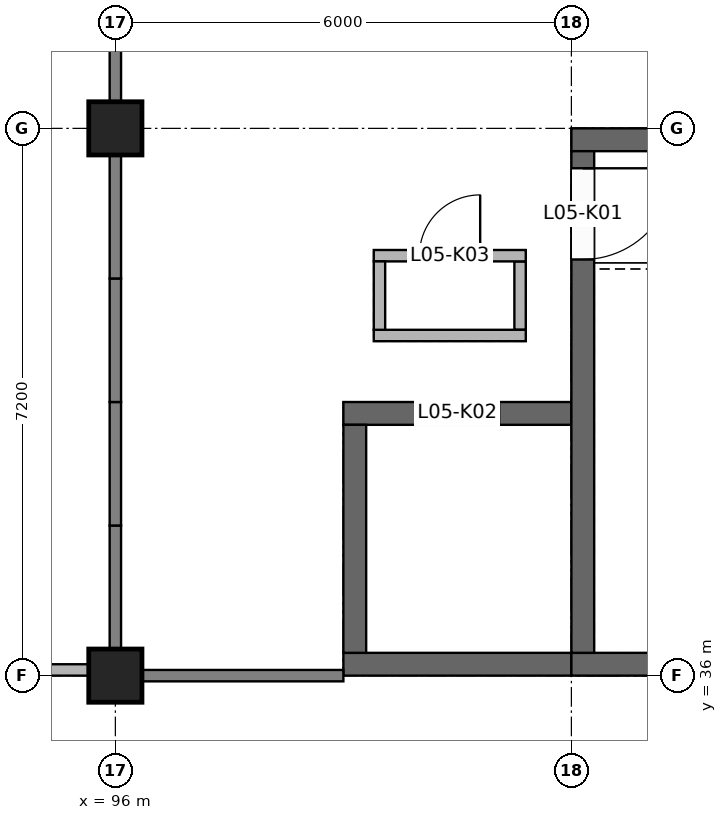
"""IFC4 building model, lengths in metres.
Left out: names, types, materials, properties, quantities, classifications, styles, units other than length and angle.
Written with IfcOpenShell. Run it as: python <this file> out.ifc"""

import sys

from ifc_helpers import new_model, si_unit, direction, frame, frame_2d, origin, origin_2d, place, context, subcontext, project, spatial, rectangle, extrude, element, fill, save


model = new_model("IFC4")
c1 = context("Model", 3, precision=1e-05, world=origin(), true_north=direction((0.0, 1.0)))
c2 = subcontext(c1, "Body", "Model", "MODEL_VIEW")
j1 = project(units=[si_unit("LENGTHUNIT", "METRE"), si_unit("PLANEANGLEUNIT", "RADIAN")], contexts=[c1])
p1 = place(None, origin())
s1 = spatial("IfcSite", under=j1, at=p1, CompositionType="ELEMENT")
p2 = place(p1, origin())
s2 = spatial("IfcBuilding", under=s1, at=p2, CompositionType="ELEMENT")
p3 = place(p2, frame((0.0, 0.0, 21.0)))
s3 = spatial("IfcBuildingStorey", under=s2, at=p3, CompositionType="ELEMENT", Elevation=21.0)
for number, where, z_axis, x_axis in (
    (1, (102.0, 36.15, 0.0), (0.0, 0.0, 1.0), (1.0, 0.0, 0.0)),
    (2, (102.0, 43.05, 0.0), (0.0, 0.0, 1.0), (1.0, 0.0, 0.0)),
):
    element("IfcWall", number, at=place(p3, frame(where, z_axis=z_axis, x_axis=x_axis)), inside=s3, PredefinedType="SHEAR", context=c2, shape_type="SweptSolid", body=[
        extrude(rectangle(XDim=6.0, YDim=0.3, at=frame_2d((3.0, 0.0))), origin(), (0.0, 0.0, 1.0), 2.75),
    ])
p4 = place(p3, frame((102.15, 36.3, 0.0), z_axis=(0.0, 0.0, 1.0), x_axis=(0.0, 1.0, 0.0)))
e3 = element("IfcWall", 3, at=p4, inside=s3, PredefinedType="SHEAR", context=c2, shape_type="SweptSolid", body=[
    extrude(rectangle(XDim=6.6, YDim=0.3, at=frame_2d((3.3, 0.0))), origin(), (0.0, 0.0, 1.0), 2.75),
])
p5 = place(p4, frame((5.175, 0.0, 0.0)))
e4 = element("IfcOpeningElement", 4, at=p5, cuts=e3, PredefinedType="OPENING", context=c2, shape_type="SweptSolid", body=[
    extrude(rectangle(XDim=1.2, YDim=2.1, at=frame_2d((0.6, 1.05))), frame((0.0, 0.16, 0.0), z_axis=(0.0, -1.0, 0.0), x_axis=(1.0, 0.0, 0.0)), (0.0, 0.0, 1.0), 0.32),
])
p6 = place(p3, frame((99.0, 36.15, 0.0), z_axis=(0.0, 0.0, 1.0), x_axis=(1.0, 0.0, 0.0)))
e5 = element("IfcWall", 5, at=p6, inside=s3, PredefinedType="SHEAR", context=c2, shape_type="SweptSolid", body=[
    extrude(rectangle(XDim=3.0, YDim=0.3, at=frame_2d((1.5, 0.0))), origin(), (0.0, 0.0, 1.0), 6.15),
])
p7 = place(p3, frame((99.0, 39.45, 0.0), z_axis=(0.0, 0.0, 1.0), x_axis=(1.0, 0.0, 0.0)))
e6 = element("IfcWall", 6, at=p7, inside=s3, PredefinedType="SHEAR", context=c2, shape_type="SweptSolid", body=[
    extrude(rectangle(XDim=3.0, YDim=0.3, at=frame_2d((1.5, 0.0))), origin(), (0.0, 0.0, 1.0), 6.15),
])
p8 = place(p7, frame((0.95, 0.0, 0.0)))
e7 = element("IfcOpeningElement", 7, at=p8, cuts=e6, PredefinedType="OPENING", context=c2, shape_type="SweptSolid", body=[
    extrude(rectangle(XDim=1.1, YDim=2.1, at=frame_2d((0.55, 1.05))), frame((0.0, 0.16, 0.0), z_axis=(0.0, -1.0, 0.0), x_axis=(1.0, 0.0, 0.0)), (0.0, 0.0, 1.0), 0.32),
])
p9 = place(p3, frame((99.15, 36.3, 0.0), z_axis=(0.0, 0.0, 1.0), x_axis=(0.0, 1.0, 0.0)))
e8 = element("IfcWall", 8, at=p9, inside=s3, PredefinedType="SHEAR", context=c2, shape_type="SweptSolid", body=[
    extrude(rectangle(XDim=3.0, YDim=0.3, at=frame_2d((1.5, 0.0))), origin(), (0.0, 0.0, 1.0), 6.15),
])
p10 = place(p3, frame((99.4, 40.475, 0.0), z_axis=(0.0, 0.0, 1.0), x_axis=(1.0, 0.0, 0.0)))
e9 = element("IfcWall", 9, at=p10, inside=s3, PredefinedType="SOLIDWALL", context=c2, shape_type="SweptSolid", body=[
    extrude(rectangle(XDim=2.0, YDim=0.15, at=frame_2d((1.0, 0.0))), origin(), (0.0, 0.0, 1.0), 2.75),
])
p11 = place(p3, frame((99.4, 41.525, 0.0), z_axis=(0.0, 0.0, 1.0), x_axis=(1.0, 0.0, 0.0)))
e10 = element("IfcWall", 10, at=p11, inside=s3, PredefinedType="SOLIDWALL", context=c2, shape_type="SweptSolid", body=[
    extrude(rectangle(XDim=2.0, YDim=0.15, at=frame_2d((1.0, 0.0))), origin(), (0.0, 0.0, 1.0), 2.75),
])
p12 = place(p11, frame((0.6, 0.0, 0.0)))
e11 = element("IfcOpeningElement", 11, at=p12, cuts=e10, PredefinedType="OPENING", context=c2, shape_type="SweptSolid", body=[
    extrude(rectangle(XDim=0.8, YDim=2.1, at=frame_2d((0.4, 1.05))), frame((0.0, 0.085, 0.0), z_axis=(0.0, -1.0, 0.0), x_axis=(1.0, 0.0, 0.0)), (0.0, 0.0, 1.0), 0.17),
])
for number, where, z_axis, x_axis in (
    (12, (99.475, 40.55, 0.0), (0.0, 0.0, 1.0), (0.0, 1.0, 0.0)),
    (13, (101.325, 40.55, 0.0), (0.0, 0.0, 1.0), (0.0, 1.0, 0.0)),
):
    element("IfcWall", number, at=place(p3, frame(where, z_axis=z_axis, x_axis=x_axis)), inside=s3, PredefinedType="SOLIDWALL", context=c2, shape_type="SweptSolid", body=[
        extrude(rectangle(XDim=0.9, YDim=0.15, at=frame_2d((0.45, 0.0))), origin(), (0.0, 0.0, 1.0), 2.75),
    ])
p13 = place(p3, frame((96.0, 36.0, 0.0), z_axis=(0.0, 0.0, 1.0), x_axis=(1.0, 0.0, 0.0)))
e14 = element("IfcColumn", 14, at=p13, inside=s3, PredefinedType="COLUMN", context=c2, shape_type="SweptSolid", body=[
    extrude(rectangle(XDim=0.7, YDim=0.7, at=origin_2d()), origin(), (0.0, 0.0, 1.0), 3.714),
])
p14 = place(p3, frame((96.0, 43.2, 0.0), z_axis=(0.0, 0.0, 1.0), x_axis=(1.0, 0.0, 0.0)))
e15 = element("IfcColumn", 15, at=p14, inside=s3, PredefinedType="COLUMN", context=c2, shape_type="SweptSolid", body=[
    extrude(rectangle(XDim=0.7, YDim=0.7, at=origin_2d()), origin(), (0.0, 0.0, 1.0), 2.247),
])
p15 = place(p3, frame((90.0, 36.075, 0.0), z_axis=(0.0, 0.0, 1.0), x_axis=(1.0, 0.0, 0.0)))
e16 = element("IfcWall", 16, at=p15, inside=s3, PredefinedType="PARAPET", context=c2, shape_type="SweptSolid", body=[
    extrude(rectangle(XDim=6.0, YDim=0.15, at=frame_2d((3.0, 0.0))), origin(), (0.0, 0.0, 1.0), 1.1),
])
p16 = place(p3, frame((90.0, 36.075, 1.1), z_axis=(0.0, 0.0, 1.0), x_axis=(1.0, 0.0, 0.0)))
e17 = element("IfcWall", 17, at=p16, inside=s3, PredefinedType="SOLIDWALL", context=c2, shape_type="SweptSolid", body=[
    extrude(rectangle(XDim=5.65, YDim=0.15, at=frame_2d((2.825, 0.0))), origin(), (0.0, 0.0, 1.0), 1.65),
])
p17 = place(p16, frame((1.117, 0.0, 0.3)))
e18 = element("IfcOpeningElement", 18, at=p17, cuts=e17, PredefinedType="OPENING", context=c2, shape_type="SweptSolid", body=[
    extrude(rectangle(XDim=1.5, YDim=1.0, at=frame_2d((0.75, 0.5))), frame((0.0, 0.085, 0.0), z_axis=(0.0, -1.0, 0.0), x_axis=(1.0, 0.0, 0.0)), (0.0, 0.0, 1.0), 0.17),
])
p18 = place(p16, frame((3.383, 0.0, 0.3)))
e19 = element("IfcOpeningElement", 19, at=p18, cuts=e17, PredefinedType="OPENING", context=c2, shape_type="SweptSolid", body=[
    extrude(rectangle(XDim=1.5, YDim=1.0, at=frame_2d((0.75, 0.5))), frame((0.0, 0.085, 0.0), z_axis=(0.0, -1.0, 0.0), x_axis=(1.0, 0.0, 0.0)), (0.0, 0.0, 1.0), 0.17),
])
p19 = place(p5, frame((1.2, 0.0, 0.0), z_axis=(0.0, 0.0, 1.0), x_axis=(-1.0, 0.0, 0.0)))
e20 = element("IfcDoor", 20, at=p19, inside=s3, OperationType="SINGLE_SWING_LEFT", PredefinedType="DOOR", context=c2, shape_type="SweptSolid", body=[
    extrude(rectangle(XDim=1.2, YDim=2.1, at=frame_2d((0.6, 1.05))), frame((0.0, 0.025, 0.0), z_axis=(0.0, -1.0, 0.0), x_axis=(1.0, 0.0, 0.0)), (0.0, 0.0, 1.0), 0.05),
])
fill(e4, e20)
p20 = place(p8, origin())
e21 = element("IfcDoor", 21, at=p20, inside=s3, OperationType="DOUBLE_DOOR_SLIDING", PredefinedType="DOOR", context=c2, shape_type="SweptSolid", body=[
    extrude(rectangle(XDim=1.1, YDim=2.1, at=frame_2d((0.55, 1.05))), frame((0.0, 0.025, 0.0), z_axis=(0.0, -1.0, 0.0), x_axis=(1.0, 0.0, 0.0)), (0.0, 0.0, 1.0), 0.05),
])
fill(e7, e21)
p21 = place(p12, origin())
e22 = element("IfcDoor", 22, at=p21, inside=s3, OperationType="SINGLE_SWING_RIGHT", PredefinedType="DOOR", context=c2, shape_type="SweptSolid", body=[
    extrude(rectangle(XDim=0.8, YDim=2.1, at=frame_2d((0.4, 1.05))), frame((0.0, 0.025, 0.0), z_axis=(0.0, -1.0, 0.0), x_axis=(1.0, 0.0, 0.0)), (0.0, 0.0, 1.0), 0.05),
])
fill(e11, e22)
save(model, sys.argv[1])
